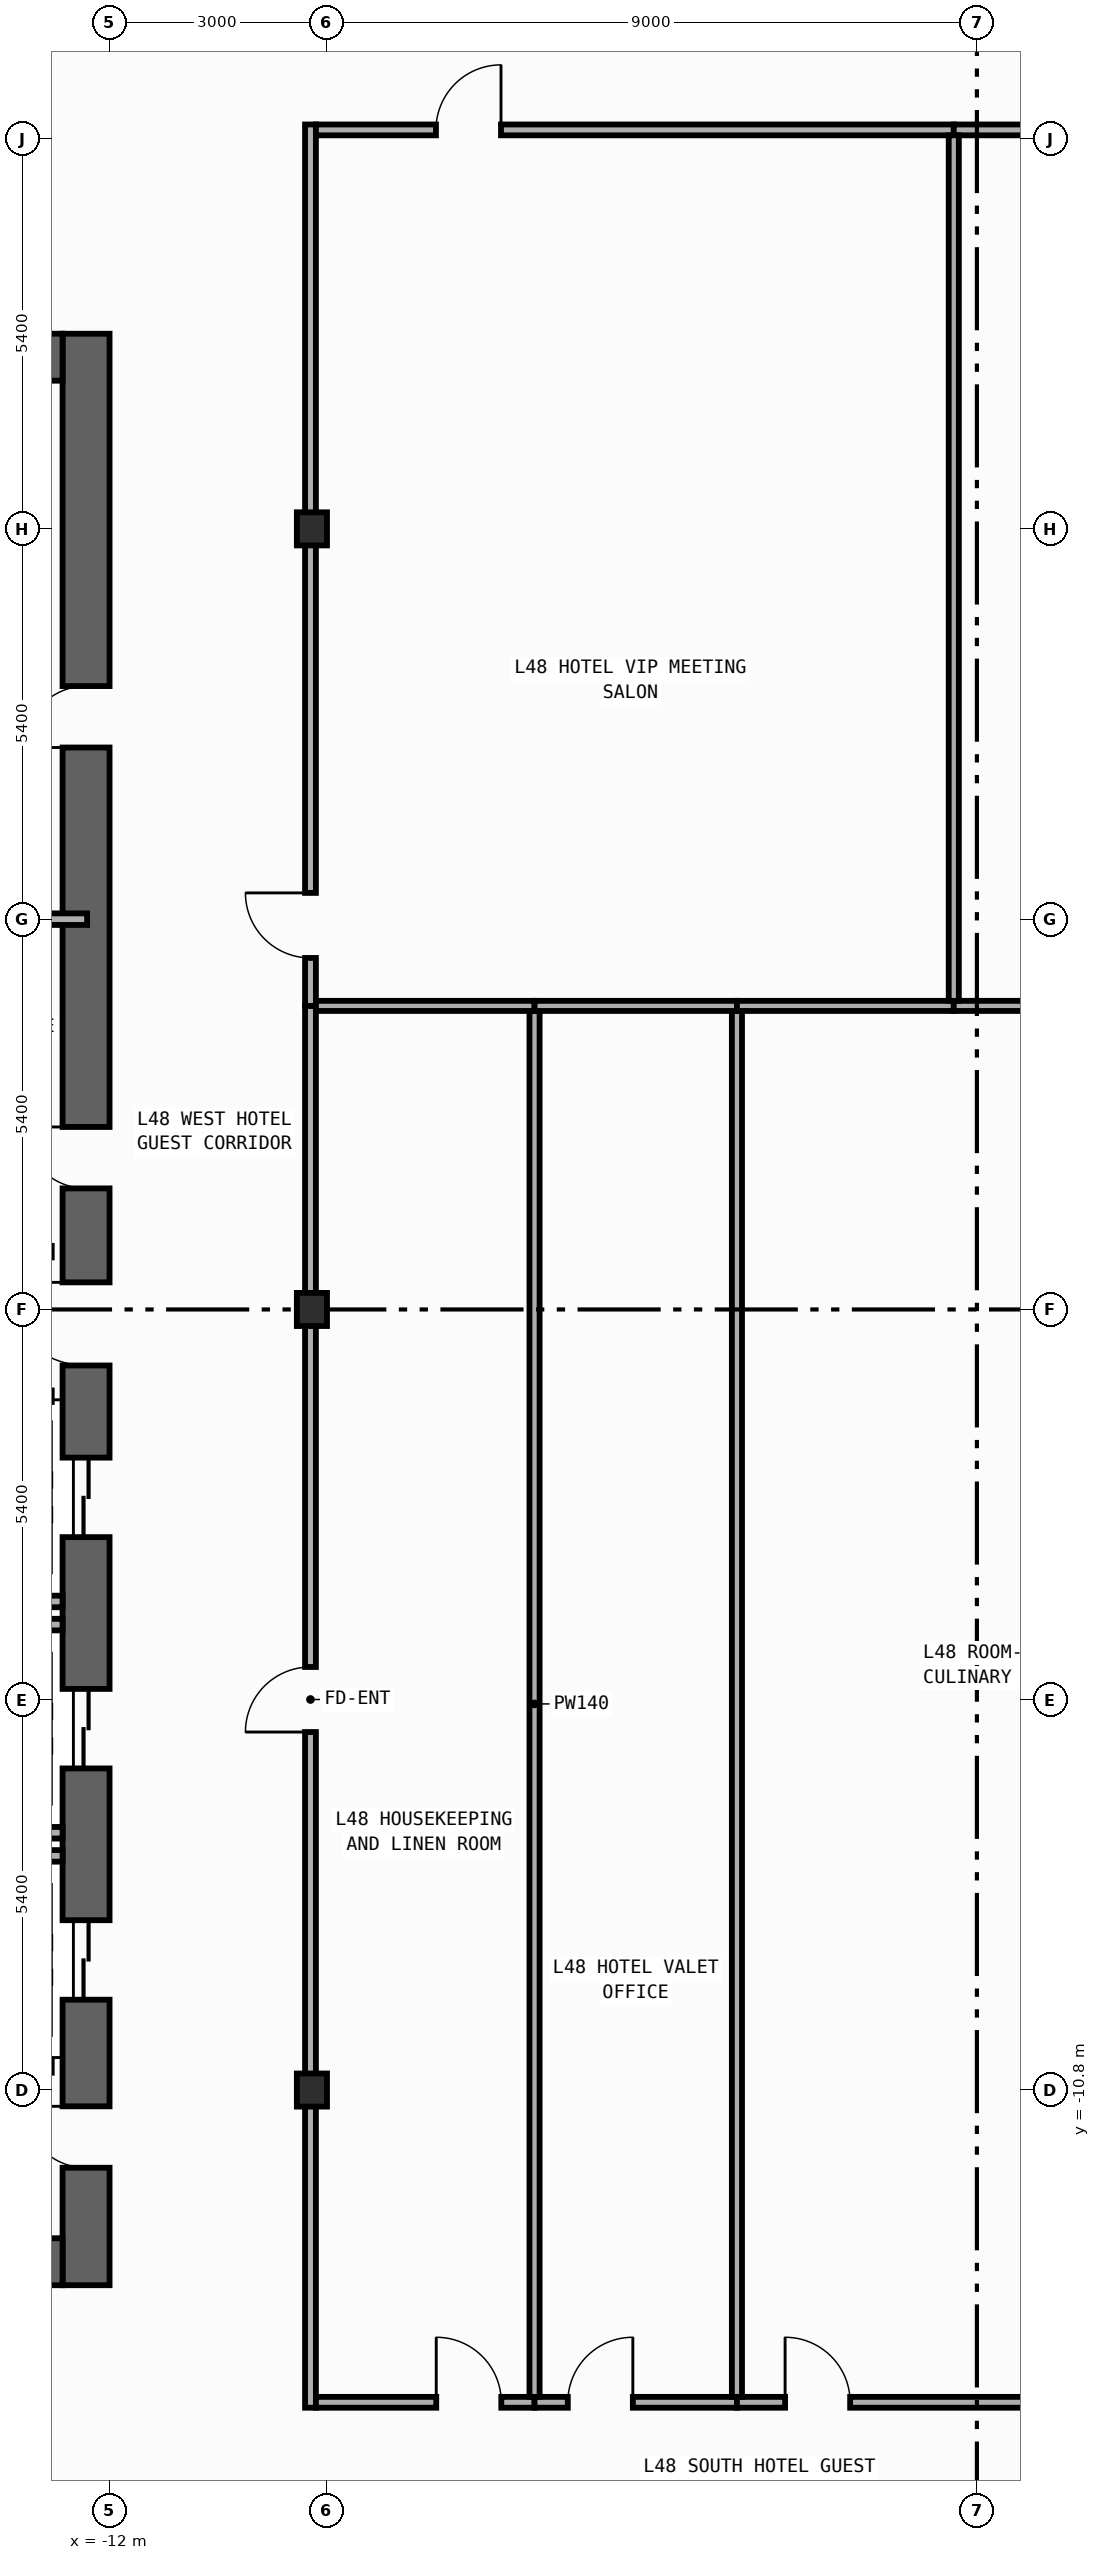
"""IFC4 building model, lengths in metres.
Left out: names, types, materials, properties, quantities, classifications, styles, units other than length and angle.
Written with IfcOpenShell. Run it as: python <this file> out.ifc"""

import sys

from ifc_helpers import new_model, si_unit, direction, frame, frame_2d, origin, origin_2d, place, context, subcontext, project, spatial, rectangle, i_section, extrude, element, fill, save


model = new_model("IFC4")
c1 = context("Model", 3, precision=1e-05, world=origin(), true_north=direction((0.0, 1.0)))
c2 = subcontext(c1, "Body", "Model", "MODEL_VIEW")
j1 = project(units=[si_unit("LENGTHUNIT", "METRE"), si_unit("PLANEANGLEUNIT", "RADIAN")], contexts=[c1])
p1 = place(None, origin())
s1 = spatial("IfcSite", under=j1, at=p1, CompositionType="ELEMENT")
p2 = place(p1, origin())
s2 = spatial("IfcBuilding", under=s1, at=p2, CompositionType="ELEMENT")
p3 = place(p2, frame((0.0, 0.0, 206.8)))
s3 = spatial("IfcBuildingStorey", under=s2, at=p3, CompositionType="ELEMENT", Elevation=206.8)
p4 = place(p3, frame((-12.325, -13.5, 0.0), z_axis=(0.0, 0.0, 1.0), x_axis=(0.0, 1.0, 0.0)))
e1 = element("IfcWall", 1, at=p4, inside=s3, PredefinedType="SHEAR", context=c2, shape_type="SweptSolid", body=[
    extrude(rectangle(XDim=27.0, YDim=0.65, at=frame_2d((13.5, 0.0))), origin(), (0.0, 0.0, 1.0), 3.54),
])
p5 = place(p4, frame((10.35, 0.0, 0.0)))
e2 = element("IfcOpeningElement", 2, at=p5, cuts=e1, PredefinedType="OPENING", context=c2, shape_type="SweptSolid", body=[
    extrude(rectangle(XDim=1.1, YDim=2.2, at=frame_2d((0.55, 1.1))), frame((0.0, 0.335, 0.0), z_axis=(0.0, -1.0, 0.0), x_axis=(1.0, 0.0, 0.0)), (0.0, 0.0, 1.0), 0.67),
])
p6 = place(p4, frame((7.15, 0.0, 0.0)))
e3 = element("IfcOpeningElement", 3, at=p6, cuts=e1, PredefinedType="OPENING", context=c2, shape_type="SweptSolid", body=[
    extrude(rectangle(XDim=1.1, YDim=2.2, at=frame_2d((0.55, 1.1))), frame((0.0, 0.335, 0.0), z_axis=(0.0, -1.0, 0.0), x_axis=(1.0, 0.0, 0.0)), (0.0, 0.0, 1.0), 0.67),
])
p7 = place(p4, frame((3.95, 0.0, 0.0)))
e4 = element("IfcOpeningElement", 4, at=p7, cuts=e1, PredefinedType="OPENING", context=c2, shape_type="SweptSolid", body=[
    extrude(rectangle(XDim=1.1, YDim=2.2, at=frame_2d((0.55, 1.1))), frame((0.0, 0.335, 0.0), z_axis=(0.0, -1.0, 0.0), x_axis=(1.0, 0.0, 0.0)), (0.0, 0.0, 1.0), 0.67),
])
p8 = place(p4, frame((15.175, 0.0, 0.0)))
e5 = element("IfcOpeningElement", 5, at=p8, cuts=e1, PredefinedType="OPENING", context=c2, shape_type="SweptSolid", body=[
    extrude(rectangle(XDim=0.85, YDim=2.1, at=frame_2d((0.425, 1.05))), frame((0.0, 0.335, 0.0), z_axis=(0.0, -1.0, 0.0), x_axis=(1.0, 0.0, 0.0)), (0.0, 0.0, 1.0), 0.67),
])
p9 = place(p4, frame((21.275, 0.0, 0.0)))
e6 = element("IfcOpeningElement", 6, at=p9, cuts=e1, PredefinedType="OPENING", context=c2, shape_type="SweptSolid", body=[
    extrude(rectangle(XDim=0.85, YDim=2.1, at=frame_2d((0.425, 1.05))), frame((0.0, 0.335, 0.0), z_axis=(0.0, -1.0, 0.0), x_axis=(1.0, 0.0, 0.0)), (0.0, 0.0, 1.0), 0.67),
])
p10 = place(p4, frame((12.725, 0.0, 0.0)))
e7 = element("IfcOpeningElement", 7, at=p10, cuts=e1, PredefinedType="OPENING", context=c2, shape_type="SweptSolid", body=[
    extrude(rectangle(XDim=1.15, YDim=2.2, at=frame_2d((0.575, 1.1))), frame((0.0, 0.335, 0.0), z_axis=(0.0, -1.0, 0.0), x_axis=(1.0, 0.0, 0.0)), (0.0, 0.0, 1.0), 0.67),
])
p11 = place(p4, frame((1.625, 0.0, 0.0)))
e8 = element("IfcOpeningElement", 8, at=p11, cuts=e1, PredefinedType="OPENING", context=c2, shape_type="SweptSolid", body=[
    extrude(rectangle(XDim=0.85, YDim=2.1, at=frame_2d((0.425, 1.05))), frame((0.0, 0.335, 0.0), z_axis=(0.0, -1.0, 0.0), x_axis=(1.0, 0.0, 0.0)), (0.0, 0.0, 1.0), 0.67),
])
for number, where, z_axis, x_axis in (
    (9, (-19.75, -13.175, 0.0), (0.0, 0.0, 1.0), (1.0, 0.0, 0.0)),
    (10, (-19.75, 13.175, 0.0), (0.0, 0.0, 1.0), (1.0, 0.0, 0.0)),
):
    element("IfcWall", number, at=place(p3, frame(where, z_axis=z_axis, x_axis=x_axis)), inside=s3, PredefinedType="SHEAR", context=c2, shape_type="SweptSolid", body=[
        extrude(rectangle(XDim=7.1, YDim=0.65, at=frame_2d((3.55, 0.0))), origin(), (0.0, 0.0, 1.0), 3.54),
    ])
for number, where, z_axis, x_axis in (
    (11, (-9.2, -10.8, 0.0), (0.0, 0.0, 1.0), (1.0, 0.0, 0.0)),
    (12, (-9.2, 0.0, 0.0), (0.0, 0.0, 1.0), (1.0, 0.0, 0.0)),
    (13, (-9.2, 10.8, 0.0), (0.0, 0.0, 1.0), (1.0, 0.0, 0.0)),
):
    element("IfcColumn", number, at=place(p3, frame(where, z_axis=z_axis, x_axis=x_axis)), inside=s3, PredefinedType="COLUMN", context=c2, shape_type="SweptSolid", body=[
        extrude(i_section(OverallWidth=0.417, OverallDepth=0.458, WebThickness=0.03, FlangeThickness=0.05, FilletRadius=0.022, at=origin_2d()), origin(), (0.0, 0.0, 1.0), 3.8),
    ])
for number, where, z_axis, x_axis in (
    (14, (-14.99, -4.04, 0.0), (0.0, 0.0, 1.0), (1.0, 0.0, 0.0)),
    (15, (-14.99, -7.24, 0.0), (0.0, 0.0, 1.0), (1.0, 0.0, 0.0)),
    (16, (-14.99, -4.36, 0.0), (0.0, 0.0, 1.0), (1.0, 0.0, 0.0)),
    (17, (-14.99, -7.56, 0.0), (0.0, 0.0, 1.0), (1.0, 0.0, 0.0)),
):
    element("IfcWall", number, at=place(p3, frame(where, z_axis=z_axis, x_axis=x_axis)), inside=s3, PredefinedType="STANDARD", context=c2, shape_type="SweptSolid", body=[
        extrude(rectangle(XDim=2.34, YDim=0.16, at=frame_2d((1.17, 0.0))), origin(), (0.0, 0.0, 1.0), 3.54),
    ])
p12 = place(p3, frame((-15.375, 5.4, 0.0), z_axis=(0.0, 0.0, 1.0), x_axis=(1.0, 0.0, 0.0)))
e18 = element("IfcWall", 18, at=p12, inside=s3, PredefinedType="PARTITIONING", context=c2, shape_type="SweptSolid", body=[
    extrude(rectangle(XDim=3.065, YDim=0.16, at=frame_2d((1.532, 0.0))), origin(), (0.0, 0.0, 1.0), 3.54),
])
p13 = place(p3, frame((-9.22, -15.195, 0.0), z_axis=(0.0, 0.0, 1.0), x_axis=(0.0, 1.0, 0.0)))
e19 = element("IfcWall", 19, at=p13, inside=s3, PredefinedType="PARTITIONING", context=c2, shape_type="SweptSolid", body=[
    extrude(rectangle(XDim=19.395, YDim=0.15, at=frame_2d((9.698, 0.0))), origin(), (0.0, 0.0, 1.0), 2.952),
])
p14 = place(p13, frame((9.348, 0.0, 0.0)))
e20 = element("IfcOpeningElement", 20, at=p14, cuts=e19, PredefinedType="OPENING", context=c2, shape_type="SweptSolid", body=[
    extrude(rectangle(XDim=0.9, YDim=2.15, at=frame_2d((0.45, 1.075))), frame((0.0, 0.085, 0.0), z_axis=(0.0, -1.0, 0.0), x_axis=(1.0, 0.0, 0.0)), (0.0, 0.0, 1.0), 0.17),
])
p15 = place(p3, frame((-9.22, 4.2, 0.0), z_axis=(0.0, 0.0, 1.0), x_axis=(0.0, 1.0, 0.0)))
e21 = element("IfcWall", 21, at=p15, inside=s3, PredefinedType="PARTITIONING", context=c2, shape_type="SweptSolid", body=[
    extrude(rectangle(XDim=12.195, YDim=0.15, at=frame_2d((6.098, 0.0))), origin(), (0.0, 0.0, 1.0), 2.952),
])
p16 = place(p15, frame((0.663, 0.0, 0.0)))
e22 = element("IfcOpeningElement", 22, at=p16, cuts=e21, PredefinedType="OPENING", context=c2, shape_type="SweptSolid", body=[
    extrude(rectangle(XDim=0.9, YDim=2.15, at=frame_2d((0.45, 1.075))), frame((0.0, 0.085, 0.0), z_axis=(0.0, -1.0, 0.0), x_axis=(1.0, 0.0, 0.0)), (0.0, 0.0, 1.0), 0.17),
])
p17 = place(p3, frame((-9.145, 16.32, 0.0), z_axis=(0.0, 0.0, 1.0), x_axis=(1.0, 0.0, 0.0)))
e23 = element("IfcWall", 23, at=p17, inside=s3, PredefinedType="PARTITIONING", context=c2, shape_type="SweptSolid", body=[
    extrude(rectangle(XDim=8.825, YDim=0.15, at=frame_2d((4.413, 0.0))), origin(), (0.0, 0.0, 1.0), 3.54),
])
p18 = place(p17, frame((1.661, 0.0, 0.0)))
e24 = element("IfcOpeningElement", 24, at=p18, cuts=e23, PredefinedType="OPENING", context=c2, shape_type="SweptSolid", body=[
    extrude(rectangle(XDim=0.9, YDim=2.15, at=frame_2d((0.45, 1.075))), frame((0.0, 0.085, 0.0), z_axis=(0.0, -1.0, 0.0), x_axis=(1.0, 0.0, 0.0)), (0.0, 0.0, 1.0), 0.17),
])
p19 = place(p3, frame((-0.32, 16.32, 0.0), z_axis=(0.0, 0.0, 1.0), x_axis=(1.0, 0.0, 0.0)))
e25 = element("IfcWall", 25, at=p19, inside=s3, PredefinedType="PARTITIONING", context=c2, shape_type="SweptSolid", body=[
    extrude(rectangle(XDim=9.465, YDim=0.15, at=frame_2d((4.732, 0.0))), origin(), (0.0, 0.0, 1.0), 3.54),
])
p20 = place(p19, frame((6.898, 0.0, 0.0)))
e26 = element("IfcOpeningElement", 26, at=p20, cuts=e25, PredefinedType="OPENING", context=c2, shape_type="SweptSolid", body=[
    extrude(rectangle(XDim=0.9, YDim=2.15, at=frame_2d((0.45, 1.075))), frame((0.0, 0.085, 0.0), z_axis=(0.0, -1.0, 0.0), x_axis=(1.0, 0.0, 0.0)), (0.0, 0.0, 1.0), 0.17),
])
p21 = place(p3, frame((-9.145, -15.12, 0.0), z_axis=(0.0, 0.0, 1.0), x_axis=(1.0, 0.0, 0.0)))
e27 = element("IfcWall", 27, at=p21, inside=s3, PredefinedType="PARTITIONING", context=c2, shape_type="SweptSolid", body=[
    extrude(rectangle(XDim=3.025, YDim=0.15, at=frame_2d((1.512, 0.0))), origin(), (0.0, 0.0, 1.0), 3.54),
])
p22 = place(p21, frame((1.665, 0.0, 0.0)))
e28 = element("IfcOpeningElement", 28, at=p22, cuts=e27, PredefinedType="OPENING", context=c2, shape_type="SweptSolid", body=[
    extrude(rectangle(XDim=0.9, YDim=2.15, at=frame_2d((0.45, 1.075))), frame((0.0, 0.085, 0.0), z_axis=(0.0, -1.0, 0.0), x_axis=(1.0, 0.0, 0.0)), (0.0, 0.0, 1.0), 0.17),
])
p23 = place(p3, frame((-6.12, -15.12, 0.0), z_axis=(0.0, 0.0, 1.0), x_axis=(1.0, 0.0, 0.0)))
e29 = element("IfcWall", 29, at=p23, inside=s3, PredefinedType="PARTITIONING", context=c2, shape_type="SweptSolid", body=[
    extrude(rectangle(XDim=2.8, YDim=0.15, at=frame_2d((1.4, 0.0))), origin(), (0.0, 0.0, 1.0), 3.54),
])
p24 = place(p23, frame((0.46, 0.0, 0.0)))
e30 = element("IfcOpeningElement", 30, at=p24, cuts=e29, PredefinedType="OPENING", context=c2, shape_type="SweptSolid", body=[
    extrude(rectangle(XDim=0.9, YDim=2.15, at=frame_2d((0.45, 1.075))), frame((0.0, 0.085, 0.0), z_axis=(0.0, -1.0, 0.0), x_axis=(1.0, 0.0, 0.0)), (0.0, 0.0, 1.0), 0.17),
])
p25 = place(p3, frame((-3.32, -15.12, 0.0), z_axis=(0.0, 0.0, 1.0), x_axis=(1.0, 0.0, 0.0)))
e31 = element("IfcWall", 31, at=p25, inside=s3, PredefinedType="PARTITIONING", context=c2, shape_type="SweptSolid", body=[
    extrude(rectangle(XDim=7.6, YDim=0.15, at=frame_2d((3.8, 0.0))), origin(), (0.0, 0.0, 1.0), 3.54),
])
p26 = place(p25, frame((0.667, 0.0, 0.0)))
e32 = element("IfcOpeningElement", 32, at=p26, cuts=e31, PredefinedType="OPENING", context=c2, shape_type="SweptSolid", body=[
    extrude(rectangle(XDim=0.9, YDim=2.15, at=frame_2d((0.45, 1.075))), frame((0.0, 0.085, 0.0), z_axis=(0.0, -1.0, 0.0), x_axis=(1.0, 0.0, 0.0)), (0.0, 0.0, 1.0), 0.17),
])
p27 = place(p3, frame((-6.12, -15.045, 0.0), z_axis=(0.0, 0.0, 1.0), x_axis=(0.0, 1.0, 0.0)))
e33 = element("IfcWall", 33, at=p27, inside=s3, PredefinedType="PARTITIONING", context=c2, shape_type="SweptSolid", body=[
    extrude(rectangle(XDim=19.175, YDim=0.14, at=frame_2d((9.587, 0.0))), origin(), (0.0, 0.0, 1.0), 3.54),
])
p28 = place(p3, frame((-9.145, 4.2, 0.0), z_axis=(0.0, 0.0, 1.0), x_axis=(1.0, 0.0, 0.0)))
e34 = element("IfcWall", 34, at=p28, inside=s3, PredefinedType="PARTITIONING", context=c2, shape_type="SweptSolid", body=[
    extrude(rectangle(XDim=3.025, YDim=0.14, at=frame_2d((1.512, 0.0))), origin(), (0.0, 0.0, 1.0), 3.54),
])
p29 = place(p3, frame((-3.32, -15.045, 0.0), z_axis=(0.0, 0.0, 1.0), x_axis=(0.0, 1.0, 0.0)))
e35 = element("IfcWall", 35, at=p29, inside=s3, PredefinedType="PARTITIONING", context=c2, shape_type="SweptSolid", body=[
    extrude(rectangle(XDim=19.175, YDim=0.14, at=frame_2d((9.587, 0.0))), origin(), (0.0, 0.0, 1.0), 3.54),
])
p30 = place(p3, frame((-6.12, 4.2, 0.0), z_axis=(0.0, 0.0, 1.0), x_axis=(1.0, 0.0, 0.0)))
e36 = element("IfcWall", 36, at=p30, inside=s3, PredefinedType="PARTITIONING", context=c2, shape_type="SweptSolid", body=[
    extrude(rectangle(XDim=2.8, YDim=0.14, at=frame_2d((1.4, 0.0))), origin(), (0.0, 0.0, 1.0), 3.54),
])
p31 = place(p3, frame((-3.32, 4.2, 0.0), z_axis=(0.0, 0.0, 1.0), x_axis=(1.0, 0.0, 0.0)))
e37 = element("IfcWall", 37, at=p31, inside=s3, PredefinedType="PARTITIONING", context=c2, shape_type="SweptSolid", body=[
    extrude(rectangle(XDim=3.0, YDim=0.14, at=frame_2d((1.5, 0.0))), origin(), (0.0, 0.0, 1.0), 3.54),
])
p32 = place(p3, frame((-0.32, 4.2, 0.0), z_axis=(0.0, 0.0, 1.0), x_axis=(1.0, 0.0, 0.0)))
e38 = element("IfcWall", 38, at=p32, inside=s3, PredefinedType="PARTITIONING", context=c2, shape_type="SweptSolid", body=[
    extrude(rectangle(XDim=4.76, YDim=0.14, at=frame_2d((2.38, 0.0))), origin(), (0.0, 0.0, 1.0), 3.54),
])
p33 = place(p3, frame((-0.32, 4.27, 0.0), z_axis=(0.0, 0.0, 1.0), x_axis=(0.0, 1.0, 0.0)))
e39 = element("IfcWall", 39, at=p33, inside=s3, PredefinedType="PARTITIONING", context=c2, shape_type="SweptSolid", body=[
    extrude(rectangle(XDim=11.975, YDim=0.14, at=frame_2d((5.988, 0.0))), origin(), (0.0, 0.0, 1.0), 3.54),
])
p34 = place(p5, origin())
e40 = element("IfcDoor", 40, at=p34, inside=s3, OperationType="DOUBLE_DOOR_SLIDING", PredefinedType="DOOR", context=c2, shape_type="SweptSolid", body=[
    extrude(rectangle(XDim=1.1, YDim=2.2, at=frame_2d((0.55, 1.1))), frame((0.0, 0.025, 0.0), z_axis=(0.0, -1.0, 0.0), x_axis=(1.0, 0.0, 0.0)), (0.0, 0.0, 1.0), 0.05),
])
fill(e2, e40)
p35 = place(p6, origin())
e41 = element("IfcDoor", 41, at=p35, inside=s3, OperationType="DOUBLE_DOOR_SLIDING", PredefinedType="DOOR", context=c2, shape_type="SweptSolid", body=[
    extrude(rectangle(XDim=1.1, YDim=2.2, at=frame_2d((0.55, 1.1))), frame((0.0, 0.025, 0.0), z_axis=(0.0, -1.0, 0.0), x_axis=(1.0, 0.0, 0.0)), (0.0, 0.0, 1.0), 0.05),
])
fill(e3, e41)
p36 = place(p7, origin())
e42 = element("IfcDoor", 42, at=p36, inside=s3, OperationType="DOUBLE_DOOR_SLIDING", PredefinedType="DOOR", context=c2, shape_type="SweptSolid", body=[
    extrude(rectangle(XDim=1.1, YDim=2.2, at=frame_2d((0.55, 1.1))), frame((0.0, 0.025, 0.0), z_axis=(0.0, -1.0, 0.0), x_axis=(1.0, 0.0, 0.0)), (0.0, 0.0, 1.0), 0.05),
])
fill(e4, e42)
p37 = place(p8, origin())
e43 = element("IfcDoor", 43, at=p37, inside=s3, OperationType="SINGLE_SWING_RIGHT", PredefinedType="DOOR", context=c2, shape_type="SweptSolid", body=[
    extrude(rectangle(XDim=0.85, YDim=2.1, at=frame_2d((0.425, 1.05))), frame((0.0, 0.025, 0.0), z_axis=(0.0, -1.0, 0.0), x_axis=(1.0, 0.0, 0.0)), (0.0, 0.0, 1.0), 0.05),
])
fill(e5, e43)
p38 = place(p9, origin())
e44 = element("IfcDoor", 44, at=p38, inside=s3, OperationType="SINGLE_SWING_LEFT", PredefinedType="DOOR", context=c2, shape_type="SweptSolid", body=[
    extrude(rectangle(XDim=0.85, YDim=2.1, at=frame_2d((0.425, 1.05))), frame((0.0, 0.025, 0.0), z_axis=(0.0, -1.0, 0.0), x_axis=(1.0, 0.0, 0.0)), (0.0, 0.0, 1.0), 0.05),
])
fill(e6, e44)
p39 = place(p10, origin())
e45 = element("IfcDoor", 45, at=p39, inside=s3, OperationType="SINGLE_SWING_RIGHT", PredefinedType="DOOR", context=c2, shape_type="SweptSolid", body=[
    extrude(rectangle(XDim=1.15, YDim=2.2, at=frame_2d((0.575, 1.1))), frame((0.0, 0.025, 0.0), z_axis=(0.0, -1.0, 0.0), x_axis=(1.0, 0.0, 0.0)), (0.0, 0.0, 1.0), 0.05),
])
fill(e7, e45)
p40 = place(p11, origin())
e46 = element("IfcDoor", 46, at=p40, inside=s3, OperationType="SINGLE_SWING_RIGHT", PredefinedType="DOOR", context=c2, shape_type="SweptSolid", body=[
    extrude(rectangle(XDim=0.85, YDim=2.1, at=frame_2d((0.425, 1.05))), frame((0.0, 0.025, 0.0), z_axis=(0.0, -1.0, 0.0), x_axis=(1.0, 0.0, 0.0)), (0.0, 0.0, 1.0), 0.05),
])
fill(e8, e46)
p41 = place(p14, origin())
e47 = element("IfcDoor", 47, at=p41, inside=s3, OperationType="SINGLE_SWING_LEFT", PredefinedType="DOOR", context=c2, shape_type="SweptSolid", body=[
    extrude(rectangle(XDim=0.9, YDim=2.15, at=frame_2d((0.45, 1.075))), frame((0.0, 0.025, 0.0), z_axis=(0.0, -1.0, 0.0), x_axis=(1.0, 0.0, 0.0)), (0.0, 0.0, 1.0), 0.05),
])
fill(e20, e47)
p42 = place(p16, origin())
e48 = element("IfcDoor", 48, at=p42, inside=s3, OperationType="SINGLE_SWING_RIGHT", PredefinedType="DOOR", context=c2, shape_type="SweptSolid", body=[
    extrude(rectangle(XDim=0.9, YDim=2.15, at=frame_2d((0.45, 1.075))), frame((0.0, 0.025, 0.0), z_axis=(0.0, -1.0, 0.0), x_axis=(1.0, 0.0, 0.0)), (0.0, 0.0, 1.0), 0.05),
])
fill(e22, e48)
p43 = place(p18, origin())
e49 = element("IfcDoor", 49, at=p43, inside=s3, OperationType="SINGLE_SWING_RIGHT", PredefinedType="DOOR", context=c2, shape_type="SweptSolid", body=[
    extrude(rectangle(XDim=0.9, YDim=2.15, at=frame_2d((0.45, 1.075))), frame((0.0, 0.025, 0.0), z_axis=(0.0, -1.0, 0.0), x_axis=(1.0, 0.0, 0.0)), (0.0, 0.0, 1.0), 0.05),
])
fill(e24, e49)
p44 = place(p22, origin())
e50 = element("IfcDoor", 50, at=p44, inside=s3, OperationType="SINGLE_SWING_LEFT", PredefinedType="DOOR", context=c2, shape_type="SweptSolid", body=[
    extrude(rectangle(XDim=0.9, YDim=2.15, at=frame_2d((0.45, 1.075))), frame((0.0, 0.025, 0.0), z_axis=(0.0, -1.0, 0.0), x_axis=(1.0, 0.0, 0.0)), (0.0, 0.0, 1.0), 0.05),
])
fill(e28, e50)
p45 = place(p24, origin())
e51 = element("IfcDoor", 51, at=p45, inside=s3, OperationType="SINGLE_SWING_RIGHT", PredefinedType="DOOR", context=c2, shape_type="SweptSolid", body=[
    extrude(rectangle(XDim=0.9, YDim=2.15, at=frame_2d((0.45, 1.075))), frame((0.0, 0.025, 0.0), z_axis=(0.0, -1.0, 0.0), x_axis=(1.0, 0.0, 0.0)), (0.0, 0.0, 1.0), 0.05),
])
fill(e30, e51)
p46 = place(p26, origin())
e52 = element("IfcDoor", 52, at=p46, inside=s3, OperationType="SINGLE_SWING_LEFT", PredefinedType="DOOR", context=c2, shape_type="SweptSolid", body=[
    extrude(rectangle(XDim=0.9, YDim=2.15, at=frame_2d((0.45, 1.075))), frame((0.0, 0.025, 0.0), z_axis=(0.0, -1.0, 0.0), x_axis=(1.0, 0.0, 0.0)), (0.0, 0.0, 1.0), 0.05),
])
fill(e32, e52)
save(model, sys.argv[1])
